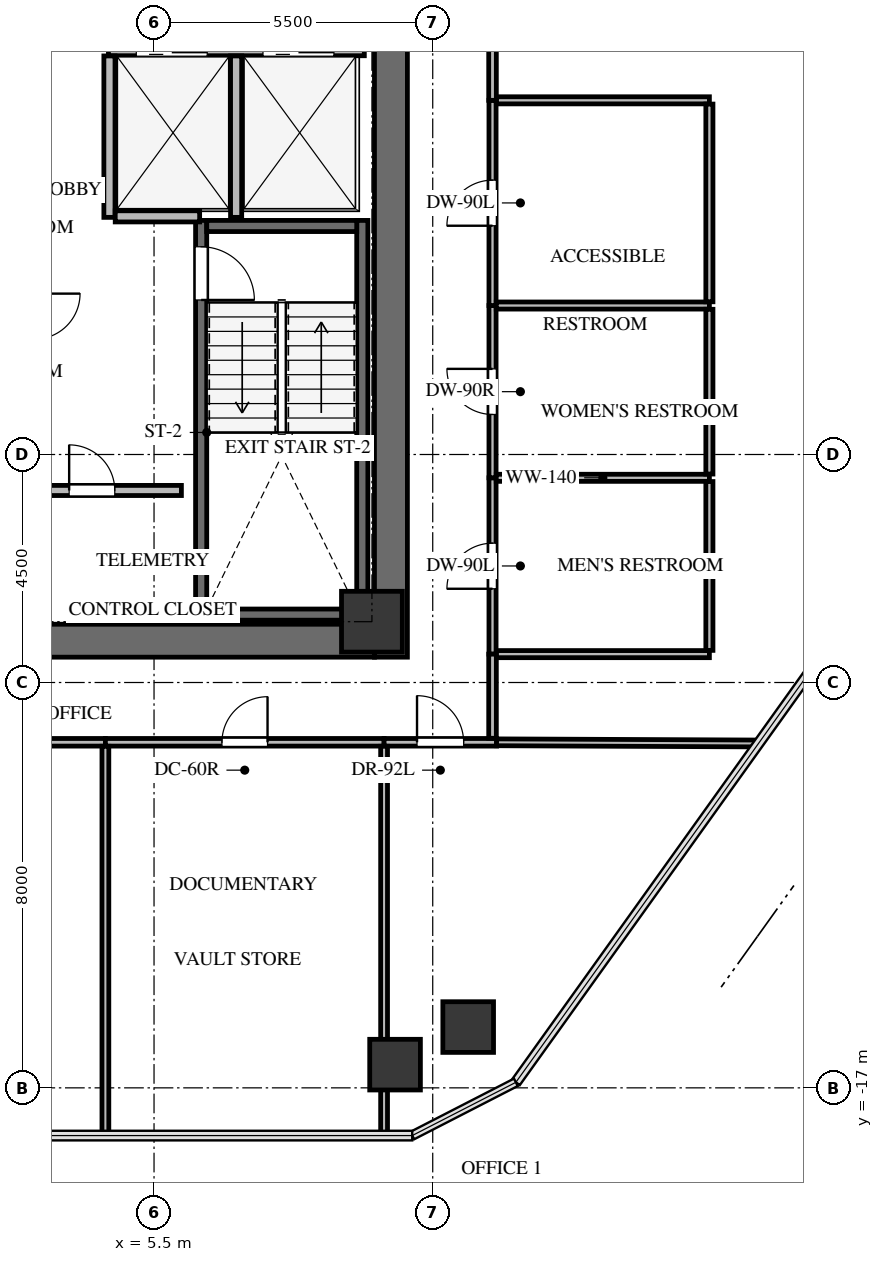
"""IFC4 building model, lengths in metres.
Left out: names, types, materials, properties, quantities, classifications, styles, units other than length and angle.
Written with IfcOpenShell. Run it as: python <this file> out.ifc"""

import sys

from ifc_helpers import new_model, si_unit, direction, frame, frame_2d, origin, origin_2d, place, context, subcontext, project, spatial, rectangle, extrude, source, transform, mapped, element, fill, save


model = new_model("IFC4")
c1 = context("Model", 3, precision=1e-05, world=origin(), true_north=direction((0.0, 1.0)))
c2 = subcontext(c1, "Body", "Model", "MODEL_VIEW")
j1 = project(units=[si_unit("LENGTHUNIT", "METRE"), si_unit("PLANEANGLEUNIT", "RADIAN")], contexts=[c1])
p1 = place(None, origin())
s1 = spatial("IfcSite", under=j1, at=p1, CompositionType="ELEMENT")
p2 = place(p1, origin())
s2 = spatial("IfcBuilding", under=s1, at=p2, CompositionType="ELEMENT")
p3 = place(p2, frame((0.0, 0.0, 177.1)))
s3 = spatial("IfcBuildingStorey", under=s2, at=p3, CompositionType="ELEMENT", Elevation=177.1)
p4 = place(p3, frame((10.175, -8.5, 0.0), z_axis=(0.0, 0.0, 1.0), x_axis=(0.0, 1.0, 0.0)))
e1 = element("IfcWall", 1, at=p4, inside=s3, PredefinedType="SHEAR", context=c2, shape_type="SweptSolid", body=[
    extrude(rectangle(XDim=17.0, YDim=0.65, at=frame_2d((8.5, 0.0))), origin(), (0.0, 0.0, 1.0), 3.3),
])
p5 = place(p3, frame((2.1, -8.175, 0.0), z_axis=(0.0, 0.0, 1.0), x_axis=(1.0, 0.0, 0.0)))
e2 = element("IfcWall", 2, at=p5, inside=s3, PredefinedType="SHEAR", context=c2, shape_type="SweptSolid", body=[
    extrude(rectangle(XDim=7.75, YDim=0.65, at=frame_2d((3.875, 0.0))), origin(), (0.0, 0.0, 1.0), 3.3),
])
p6 = place(p3, frame((9.61, -7.77, -0.24), z_axis=(0.0, 0.0, 1.0), x_axis=(0.0, 1.0, 0.0)))
e3 = element("IfcWall", 3, at=p6, inside=s3, PredefinedType="SHEAR", context=c2, shape_type="SweptSolid", body=[
    extrude(rectangle(XDim=7.89, YDim=0.22, at=frame_2d((3.945, 0.0))), origin(), (0.0, 0.0, 1.0), 3.3),
])
p7 = place(p3, frame((6.43, 0.12, -0.24), z_axis=(0.0, 0.0, 1.0), x_axis=(0.0, -1.0, 0.0)))
e4 = element("IfcWall", 4, at=p7, inside=s3, PredefinedType="SHEAR", context=c2, shape_type="SweptSolid", body=[
    extrude(rectangle(XDim=7.89, YDim=0.22, at=frame_2d((3.945, 0.0))), origin(), (0.0, 0.0, 1.0), 3.3),
])
p8 = place(p7, frame((0.52, 0.0, 0.0)))
e5 = element("IfcOpeningElement", 5, at=p8, cuts=e4, PredefinedType="OPENING", context=c2, shape_type="SweptSolid", body=[
    extrude(rectangle(XDim=1.05, YDim=2.15, at=frame_2d((0.525, 1.075))), frame((0.0, 0.12, 0.0), z_axis=(0.0, -1.0, 0.0), x_axis=(1.0, 0.0, 0.0)), (0.0, 0.0, 1.0), 0.24),
])
for number, where, z_axis, x_axis in (
    (6, (6.54, -7.66, -0.24), (0.0, 0.0, 1.0), (1.0, 0.0, 0.0)),
    (7, (9.5, 0.01, -0.24), (0.0, 0.0, 1.0), (-1.0, 0.0, 0.0)),
):
    element("IfcWall", number, at=place(p3, frame(where, z_axis=z_axis, x_axis=x_axis)), inside=s3, PredefinedType="SHEAR", context=c2, shape_type="SweptSolid", body=[
        extrude(rectangle(XDim=2.96, YDim=0.22, at=frame_2d((1.48, 0.0))), origin(), (0.0, 0.0, 1.0), 3.3),
    ])
m1 = source(origin(), c2, "Body", "SweptSolid", [
    extrude(rectangle(XDim=1.2, YDim=1.2, at=origin_2d()), origin(), (0.0, 0.0, 1.0), 3.3),
])
p9 = place(p3, frame((9.8, -7.8, -0.24), z_axis=(0.0, 0.0, 1.0), x_axis=(1.0, 0.0, 0.0)))
e8 = element("IfcColumn", 8, at=p9, inside=s3, PredefinedType="COLUMN", context=c2, shape_type="MappedRepresentation", body=[
    mapped(m1, transform((0.0, 0.0, 0.0), x_axis=(1.0, 0.0, 0.0), y_axis=(0.0, 1.0, 0.0), z_axis=(0.0, 0.0, 1.0), scale=1.0)),
])
m2 = source(origin(), c2, "Body", "SweptSolid", [
    extrude(rectangle(XDim=1.0, YDim=1.0, at=origin_2d()), origin(), (0.0, 0.0, 1.0), 3.3),
])
for number, where, z_axis, x_axis in (
    (9, (11.7, -15.8, -0.24), (0.0, 0.0, 1.0), (1.0, 0.0, 0.0)),
    (10, (10.257, -16.542, -0.24), (0.0, 0.0, 1.0), (1.0, 0.0, 0.0)),
):
    element("IfcColumn", number, at=place(p3, frame(where, z_axis=z_axis, x_axis=x_axis)), inside=s3, PredefinedType="COLUMN", context=c2, shape_type="MappedRepresentation", body=[
        mapped(m2, transform((0.0, 0.0, 0.0), x_axis=(1.0, 0.0, 0.0), y_axis=(0.0, 1.0, 0.0), z_axis=(0.0, 0.0, 1.0), scale=1.0)),
    ])
p10 = place(p3, frame((4.6, 3.48, 0.0), z_axis=(0.0, 0.0, 1.0), x_axis=(1.0, 0.0, 0.0)))
e11 = element("IfcWall", 11, at=p10, inside=s3, PredefinedType="SOLIDWALL", context=c2, shape_type="SweptSolid", body=[
    extrude(rectangle(XDim=5.05, YDim=0.22, at=frame_2d((2.525, 0.0))), origin(), (0.0, 0.0, 1.0), 3.045),
])
p11 = place(p10, frame((0.55, 0.0, 0.0)))
e12 = element("IfcOpeningElement", 12, at=p11, cuts=e11, PredefinedType="OPENING", context=c2, shape_type="SweptSolid", body=[
    extrude(rectangle(XDim=1.4, YDim=2.15, at=frame_2d((0.7, 1.075))), frame((0.0, 0.12, 0.0), z_axis=(0.0, -1.0, 0.0), x_axis=(1.0, 0.0, 0.0)), (0.0, 0.0, 1.0), 0.24),
])
p12 = place(p10, frame((3.05, 0.0, 0.0)))
e13 = element("IfcOpeningElement", 13, at=p12, cuts=e11, PredefinedType="OPENING", context=c2, shape_type="SweptSolid", body=[
    extrude(rectangle(XDim=1.4, YDim=2.15, at=frame_2d((0.7, 1.075))), frame((0.0, 0.12, 0.0), z_axis=(0.0, -1.0, 0.0), x_axis=(1.0, 0.0, 0.0)), (0.0, 0.0, 1.0), 0.24),
])
for number, where, z_axis, x_axis in (
    (14, (4.62, 0.18, 0.0), (0.0, 0.0, 1.0), (0.0, 1.0, 0.0)),
    (15, (7.12, 0.18, 0.0), (0.0, 0.0, 1.0), (0.0, 1.0, 0.0)),
):
    element("IfcWall", number, at=place(p3, frame(where, z_axis=z_axis, x_axis=x_axis)), inside=s3, PredefinedType="SOLIDWALL", context=c2, shape_type="SweptSolid", body=[
        extrude(rectangle(XDim=3.186, YDim=0.22, at=frame_2d((1.593, 0.0))), origin(), (0.0, 0.0, 1.0), 3.045),
    ])
p13 = place(p3, frame((4.734, 0.2, 0.0), z_axis=(0.0, 0.0, 1.0), x_axis=(1.0, 0.0, 0.0)))
e16 = element("IfcWall", 16, at=p13, inside=s3, PredefinedType="SOLIDWALL", context=c2, shape_type="SweptSolid", body=[
    extrude(rectangle(XDim=1.666, YDim=0.22, at=frame_2d((0.833, 0.0))), origin(), (0.0, 0.0, 1.0), 3.045),
])
p14 = place(p3, frame((2.51, -5.21, 0.0), z_axis=(0.0, 0.0, 1.0), x_axis=(1.0, 0.0, 0.0)))
e17 = element("IfcWall", 17, at=p14, inside=s3, PredefinedType="SOLIDWALL", context=c2, shape_type="SweptSolid", body=[
    extrude(rectangle(XDim=3.53, YDim=0.2, at=frame_2d((1.765, 0.0))), origin(), (0.0, 0.0, 1.0), 3.045),
])
p15 = place(p14, frame((1.315, 0.0, 0.0)))
e18 = element("IfcOpeningElement", 18, at=p15, cuts=e17, PredefinedType="OPENING", context=c2, shape_type="SweptSolid", body=[
    extrude(rectangle(XDim=0.9, YDim=2.05, at=frame_2d((0.45, 1.025))), frame((0.0, 0.11, 0.0), z_axis=(0.0, -1.0, 0.0), x_axis=(1.0, 0.0, 0.0)), (0.0, 0.0, 1.0), 0.22),
])
p16 = place(p3, frame((12.18, -8.44, 0.0), z_axis=(0.0, 0.0, 1.0), x_axis=(0.0, 1.0, 0.0)))
e19 = element("IfcWall", 19, at=p16, inside=s3, PredefinedType="PARTITIONING", context=c2, shape_type="SweptSolid", body=[
    extrude(rectangle(XDim=3.48, YDim=0.14, at=frame_2d((1.74, 0.0))), origin(), (0.0, 0.0, 1.0), 3.045),
])
p17 = place(p16, frame((1.29, 0.0, 0.0)))
e20 = element("IfcOpeningElement", 20, at=p17, cuts=e19, PredefinedType="OPENING", context=c2, shape_type="SweptSolid", body=[
    extrude(rectangle(XDim=0.9, YDim=2.05, at=frame_2d((0.45, 1.025))), frame((0.0, 0.08, 0.0), z_axis=(0.0, -1.0, 0.0), x_axis=(1.0, 0.0, 0.0)), (0.0, 0.0, 1.0), 0.16),
])
p18 = place(p3, frame((12.18, -4.96, 0.0), z_axis=(0.0, 0.0, 1.0), x_axis=(0.0, 1.0, 0.0)))
e21 = element("IfcWall", 21, at=p18, inside=s3, PredefinedType="PARTITIONING", context=c2, shape_type="SweptSolid", body=[
    extrude(rectangle(XDim=3.4, YDim=0.14, at=frame_2d((1.7, 0.0))), origin(), (0.0, 0.0, 1.0), 3.045),
])
p19 = place(p18, frame((1.25, 0.0, 0.0)))
e22 = element("IfcOpeningElement", 22, at=p19, cuts=e21, PredefinedType="OPENING", context=c2, shape_type="SweptSolid", body=[
    extrude(rectangle(XDim=0.9, YDim=2.05, at=frame_2d((0.45, 1.025))), frame((0.0, 0.08, 0.0), z_axis=(0.0, -1.0, 0.0), x_axis=(1.0, 0.0, 0.0)), (0.0, 0.0, 1.0), 0.16),
])
p20 = place(p3, frame((12.18, -1.56, 0.0), z_axis=(0.0, 0.0, 1.0), x_axis=(0.0, 1.0, 0.0)))
e23 = element("IfcWall", 23, at=p20, inside=s3, PredefinedType="PARTITIONING", context=c2, shape_type="SweptSolid", body=[
    extrude(rectangle(XDim=4.05, YDim=0.14, at=frame_2d((2.025, 0.0))), origin(), (0.0, 0.0, 1.0), 2.242),
])
p21 = place(p20, frame((1.575, 0.0, 0.0)))
e24 = element("IfcOpeningElement", 24, at=p21, cuts=e23, PredefinedType="OPENING", context=c2, shape_type="SweptSolid", body=[
    extrude(rectangle(XDim=0.9, YDim=2.05, at=frame_2d((0.45, 1.025))), frame((0.0, 0.08, 0.0), z_axis=(0.0, -1.0, 0.0), x_axis=(1.0, 0.0, 0.0)), (0.0, 0.0, 1.0), 0.16),
])
p22 = place(p3, frame((1.089, -10.18, 0.0), z_axis=(0.0, 0.0, 1.0), x_axis=(1.0, 0.0, 0.0)))
e25 = element("IfcWall", 25, at=p22, inside=s3, PredefinedType="PARTITIONING", context=c2, shape_type="SweptSolid", body=[
    extrude(rectangle(XDim=3.451, YDim=0.15, at=frame_2d((1.726, 0.0))), origin(), (0.0, 0.0, 1.0), 2.242),
])
p23 = place(p3, frame((4.54, -10.18, 0.0), z_axis=(0.0, 0.0, 1.0), x_axis=(1.0, 0.0, 0.0)))
e26 = element("IfcWall", 26, at=p23, inside=s3, PredefinedType="PARTITIONING", context=c2, shape_type="SweptSolid", body=[
    extrude(rectangle(XDim=5.5, YDim=0.15, at=frame_2d((2.75, 0.0))), origin(), (0.0, 0.0, 1.0), 2.242),
])
p24 = place(p23, frame((2.3, 0.0, 0.0)))
e27 = element("IfcOpeningElement", 27, at=p24, cuts=e26, PredefinedType="OPENING", context=c2, shape_type="SweptSolid", body=[
    extrude(rectangle(XDim=0.9, YDim=2.05, at=frame_2d((0.45, 1.025))), frame((0.0, 0.085, 0.0), z_axis=(0.0, -1.0, 0.0), x_axis=(1.0, 0.0, 0.0)), (0.0, 0.0, 1.0), 0.17),
])
p25 = place(p3, frame((10.04, -10.18, 0.0), z_axis=(0.0, 0.0, 1.0), x_axis=(1.0, 0.0, 0.0)))
e28 = element("IfcWall", 28, at=p25, inside=s3, PredefinedType="PARTITIONING", context=c2, shape_type="SweptSolid", body=[
    extrude(rectangle(XDim=2.22, YDim=0.15, at=frame_2d((1.11, 0.0))), origin(), (0.0, 0.0, 1.0), 3.045),
])
p26 = place(p25, frame((0.65, 0.0, 0.0)))
e29 = element("IfcOpeningElement", 29, at=p26, cuts=e28, PredefinedType="OPENING", context=c2, shape_type="SweptSolid", body=[
    extrude(rectangle(XDim=0.92, YDim=2.1, at=frame_2d((0.46, 1.05))), frame((0.0, 0.085, 0.0), z_axis=(0.0, -1.0, 0.0), x_axis=(1.0, 0.0, 0.0)), (0.0, 0.0, 1.0), 0.17),
])
p27 = place(p3, frame((12.18, 2.49, 0.0), z_axis=(0.0, 0.0, 1.0), x_axis=(0.0, 1.0, 0.0)))
e30 = element("IfcWall", 30, at=p27, inside=s3, PredefinedType="PARTITIONING", context=c2, shape_type="SweptSolid", body=[
    extrude(rectangle(XDim=7.611, YDim=0.15, at=frame_2d((3.806, 0.0))), origin(), (0.0, 0.0, 1.0), 3.045),
])
p28 = place(p27, frame((3.331, 0.0, 0.0)))
e31 = element("IfcOpeningElement", 31, at=p28, cuts=e30, PredefinedType="OPENING", context=c2, shape_type="SweptSolid", body=[
    extrude(rectangle(XDim=0.95, YDim=2.1, at=frame_2d((0.475, 1.05))), frame((0.0, 0.085, 0.0), z_axis=(0.0, -1.0, 0.0), x_axis=(1.0, 0.0, 0.0)), (0.0, 0.0, 1.0), 0.17),
])
p29 = place(p3, frame((12.18, -10.101, 0.0), z_axis=(0.0, 0.0, 1.0), x_axis=(0.0, 1.0, 0.0)))
e32 = element("IfcWall", 32, at=p29, inside=s3, PredefinedType="PARTITIONING", context=c2, shape_type="SweptSolid", body=[
    extrude(rectangle(XDim=1.661, YDim=0.15, at=frame_2d((0.831, 0.0))), origin(), (0.0, 0.0, 1.0), 3.045),
])
p30 = place(p3, frame((12.254, -4.96, 0.0), z_axis=(0.0, 0.0, 1.0), x_axis=(1.0, 0.0, 0.0)))
e33 = element("IfcWall", 33, at=p30, inside=s3, PredefinedType="PARTITIONING", context=c2, shape_type="SweptSolid", body=[
    extrude(rectangle(XDim=4.206, YDim=0.14, at=frame_2d((2.103, 0.0))), origin(), (0.0, 0.0, 1.0), 3.045),
])
p31 = place(p3, frame((16.46, -8.44, 0.0), z_axis=(0.0, 0.0, 1.0), x_axis=(-1.0, 0.0, 0.0)))
e34 = element("IfcWall", 34, at=p31, inside=s3, PredefinedType="PARTITIONING", context=c2, shape_type="SweptSolid", body=[
    extrude(rectangle(XDim=4.201, YDim=0.14, at=frame_2d((2.101, 0.0))), origin(), (0.0, 0.0, 1.0), 3.045),
])
p32 = place(p3, frame((16.46, -5.034, 0.0), z_axis=(0.0, 0.0, 1.0), x_axis=(0.0, -1.0, 0.0)))
e35 = element("IfcWall", 35, at=p32, inside=s3, PredefinedType="PARTITIONING", context=c2, shape_type="SweptSolid", body=[
    extrude(rectangle(XDim=3.332, YDim=0.14, at=frame_2d((1.666, 0.0))), origin(), (0.0, 0.0, 1.0), 3.045),
])
p33 = place(p3, frame((12.254, -1.56, 0.0), z_axis=(0.0, 0.0, 1.0), x_axis=(1.0, 0.0, 0.0)))
e36 = element("IfcWall", 36, at=p33, inside=s3, PredefinedType="PARTITIONING", context=c2, shape_type="SweptSolid", body=[
    extrude(rectangle(XDim=4.206, YDim=0.14, at=frame_2d((2.103, 0.0))), origin(), (0.0, 0.0, 1.0), 3.045),
])
p34 = place(p3, frame((16.46, -1.634, 0.0), z_axis=(0.0, 0.0, 1.0), x_axis=(0.0, -1.0, 0.0)))
e37 = element("IfcWall", 37, at=p34, inside=s3, PredefinedType="PARTITIONING", context=c2, shape_type="SweptSolid", body=[
    extrude(rectangle(XDim=3.252, YDim=0.14, at=frame_2d((1.626, 0.0))), origin(), (0.0, 0.0, 1.0), 3.045),
])
p35 = place(p3, frame((12.259, 2.49, 0.0), z_axis=(0.0, 0.0, 1.0), x_axis=(1.0, 0.0, 0.0)))
e38 = element("IfcWall", 38, at=p35, inside=s3, PredefinedType="PARTITIONING", context=c2, shape_type="SweptSolid", body=[
    extrude(rectangle(XDim=4.201, YDim=0.14, at=frame_2d((2.101, 0.0))), origin(), (0.0, 0.0, 1.0), 3.045),
])
p36 = place(p3, frame((16.46, 2.416, 0.0), z_axis=(0.0, 0.0, 1.0), x_axis=(0.0, -1.0, 0.0)))
e39 = element("IfcWall", 39, at=p36, inside=s3, PredefinedType="PARTITIONING", context=c2, shape_type="SweptSolid", body=[
    extrude(rectangle(XDim=3.902, YDim=0.14, at=frame_2d((1.951, 0.0))), origin(), (0.0, 0.0, 1.0), 2.242),
])
p37 = place(p3, frame((4.54, -10.259, 0.0), z_axis=(0.0, 0.0, 1.0), x_axis=(0.0, -1.0, 0.0)))
e40 = element("IfcWall", 40, at=p37, inside=s3, PredefinedType="PARTITIONING", context=c2, shape_type="SweptSolid", body=[
    extrude(rectangle(XDim=7.683, YDim=0.135, at=frame_2d((3.841, 0.0))), origin(), (0.0, 0.0, 1.0), 2.399),
])
p38 = place(p3, frame((10.04, -10.259, 0.0), z_axis=(0.0, 0.0, 1.0), x_axis=(0.0, -1.0, 0.0)))
e41 = element("IfcWall", 41, at=p38, inside=s3, PredefinedType="PARTITIONING", context=c2, shape_type="SweptSolid", body=[
    extrude(rectangle(XDim=6.367, YDim=0.135, at=frame_2d((3.184, 0.0))), origin(), (0.0, 0.0, 1.0), 2.242),
])
p39 = place(p3, frame((10.04, -16.626, 0.0), z_axis=(0.0, 0.0, 1.0), x_axis=(0.0, -1.0, 0.0)))
e42 = element("IfcWall", 42, at=p39, inside=s3, PredefinedType="PARTITIONING", context=c2, shape_type="SweptSolid", body=[
    extrude(rectangle(XDim=1.316, YDim=0.135, at=frame_2d((0.658, 0.0))), origin(), (0.0, 0.0, 1.0), 1.877),
])
p40 = place(p3, frame((12.26, -10.18, 0.0), z_axis=(0.0, 0.0, 1.0), x_axis=(0.999990144117, -0.004439782427, 0.0)))
e43 = element("IfcWall", 43, at=p40, inside=s3, PredefinedType="PARTITIONING", context=c2, shape_type="SweptSolid", body=[
    extrude(rectangle(XDim=5.169, YDim=0.135, at=frame_2d((2.584, 0.0))), origin(), (0.0, 0.0, 1.0), 2.399),
])
m3 = source(origin(), c2, "Body", "SweptSolid", [
    extrude(rectangle(XDim=1.05, YDim=2.15, at=frame_2d((0.525, 1.075))), frame((0.0, 0.025, 0.0), z_axis=(0.0, -1.0, 0.0), x_axis=(1.0, 0.0, 0.0)), (0.0, 0.0, 1.0), 0.05),
])
p41 = place(p8, origin())
e44 = element("IfcDoor", 44, at=p41, inside=s3, OperationType="SINGLE_SWING_RIGHT", PredefinedType="DOOR", context=c2, shape_type="MappedRepresentation", body=[
    mapped(m3, transform((0.0, 0.0, 0.0), x_axis=(1.0, 0.0, 0.0), y_axis=(0.0, 1.0, 0.0), z_axis=(0.0, 0.0, 1.0), scale=1.0)),
])
fill(e5, e44)
m4 = source(origin(), c2, "Body", "SweptSolid", [
    extrude(rectangle(XDim=0.9, YDim=2.05, at=frame_2d((0.45, 1.025))), frame((0.0, 0.025, 0.0), z_axis=(0.0, -1.0, 0.0), x_axis=(1.0, 0.0, 0.0)), (0.0, 0.0, 1.0), 0.05),
])
p42 = place(p15, origin())
e45 = element("IfcDoor", 45, at=p42, inside=s3, OperationType="SINGLE_SWING_LEFT", PredefinedType="DOOR", context=c2, shape_type="MappedRepresentation", body=[
    mapped(m4, transform((0.0, 0.0, 0.0), x_axis=(1.0, 0.0, 0.0), y_axis=(0.0, 1.0, 0.0), z_axis=(0.0, 0.0, 1.0), scale=1.0)),
])
fill(e18, e45)
m5 = source(origin(), c2, "Body", "SweptSolid", [
    extrude(rectangle(XDim=0.9, YDim=2.05, at=frame_2d((0.45, 1.025))), frame((0.0, 0.025, 0.0), z_axis=(0.0, -1.0, 0.0), x_axis=(1.0, 0.0, 0.0)), (0.0, 0.0, 1.0), 0.05),
])
p43 = place(p17, origin())
e46 = element("IfcDoor", 46, at=p43, inside=s3, OperationType="SINGLE_SWING_LEFT", PredefinedType="DOOR", context=c2, shape_type="MappedRepresentation", body=[
    mapped(m5, transform((0.0, 0.0, 0.0), x_axis=(1.0, 0.0, 0.0), y_axis=(0.0, 1.0, 0.0), z_axis=(0.0, 0.0, 1.0), scale=1.0)),
])
fill(e20, e46)
m6 = source(origin(), c2, "Body", "SweptSolid", [
    extrude(rectangle(XDim=0.9, YDim=2.05, at=frame_2d((0.45, 1.025))), frame((0.0, 0.025, 0.0), z_axis=(0.0, -1.0, 0.0), x_axis=(1.0, 0.0, 0.0)), (0.0, 0.0, 1.0), 0.05),
])
p44 = place(p19, origin())
e47 = element("IfcDoor", 47, at=p44, inside=s3, OperationType="SINGLE_SWING_RIGHT", PredefinedType="DOOR", context=c2, shape_type="MappedRepresentation", body=[
    mapped(m6, transform((0.0, 0.0, 0.0), x_axis=(1.0, 0.0, 0.0), y_axis=(0.0, 1.0, 0.0), z_axis=(0.0, 0.0, 1.0), scale=1.0)),
])
fill(e22, e47)
p45 = place(p21, origin())
e48 = element("IfcDoor", 48, at=p45, inside=s3, OperationType="SINGLE_SWING_LEFT", PredefinedType="DOOR", context=c2, shape_type="MappedRepresentation", body=[
    mapped(m5, transform((0.0, 0.0, 0.0), x_axis=(1.0, 0.0, 0.0), y_axis=(0.0, 1.0, 0.0), z_axis=(0.0, 0.0, 1.0), scale=1.0)),
])
fill(e24, e48)
m7 = source(origin(), c2, "Body", "SweptSolid", [
    extrude(rectangle(XDim=0.9, YDim=2.05, at=frame_2d((0.45, 1.025))), frame((0.0, 0.025, 0.0), z_axis=(0.0, -1.0, 0.0), x_axis=(1.0, 0.0, 0.0)), (0.0, 0.0, 1.0), 0.05),
])
p46 = place(p24, origin())
e49 = element("IfcDoor", 49, at=p46, inside=s3, OperationType="SINGLE_SWING_RIGHT", PredefinedType="DOOR", context=c2, shape_type="MappedRepresentation", body=[
    mapped(m7, transform((0.0, 0.0, 0.0), x_axis=(1.0, 0.0, 0.0), y_axis=(0.0, 1.0, 0.0), z_axis=(0.0, 0.0, 1.0), scale=1.0)),
])
fill(e27, e49)
m8 = source(origin(), c2, "Body", "SweptSolid", [
    extrude(rectangle(XDim=0.92, YDim=2.1, at=frame_2d((0.46, 1.05))), frame((0.0, 0.025, 0.0), z_axis=(0.0, -1.0, 0.0), x_axis=(1.0, 0.0, 0.0)), (0.0, 0.0, 1.0), 0.05),
])
p47 = place(p26, origin())
e50 = element("IfcDoor", 50, at=p47, inside=s3, OperationType="SINGLE_SWING_LEFT", PredefinedType="DOOR", context=c2, shape_type="MappedRepresentation", body=[
    mapped(m8, transform((0.0, 0.0, 0.0), x_axis=(1.0, 0.0, 0.0), y_axis=(0.0, 1.0, 0.0), z_axis=(0.0, 0.0, 1.0), scale=1.0)),
])
fill(e29, e50)
save(model, sys.argv[1])
